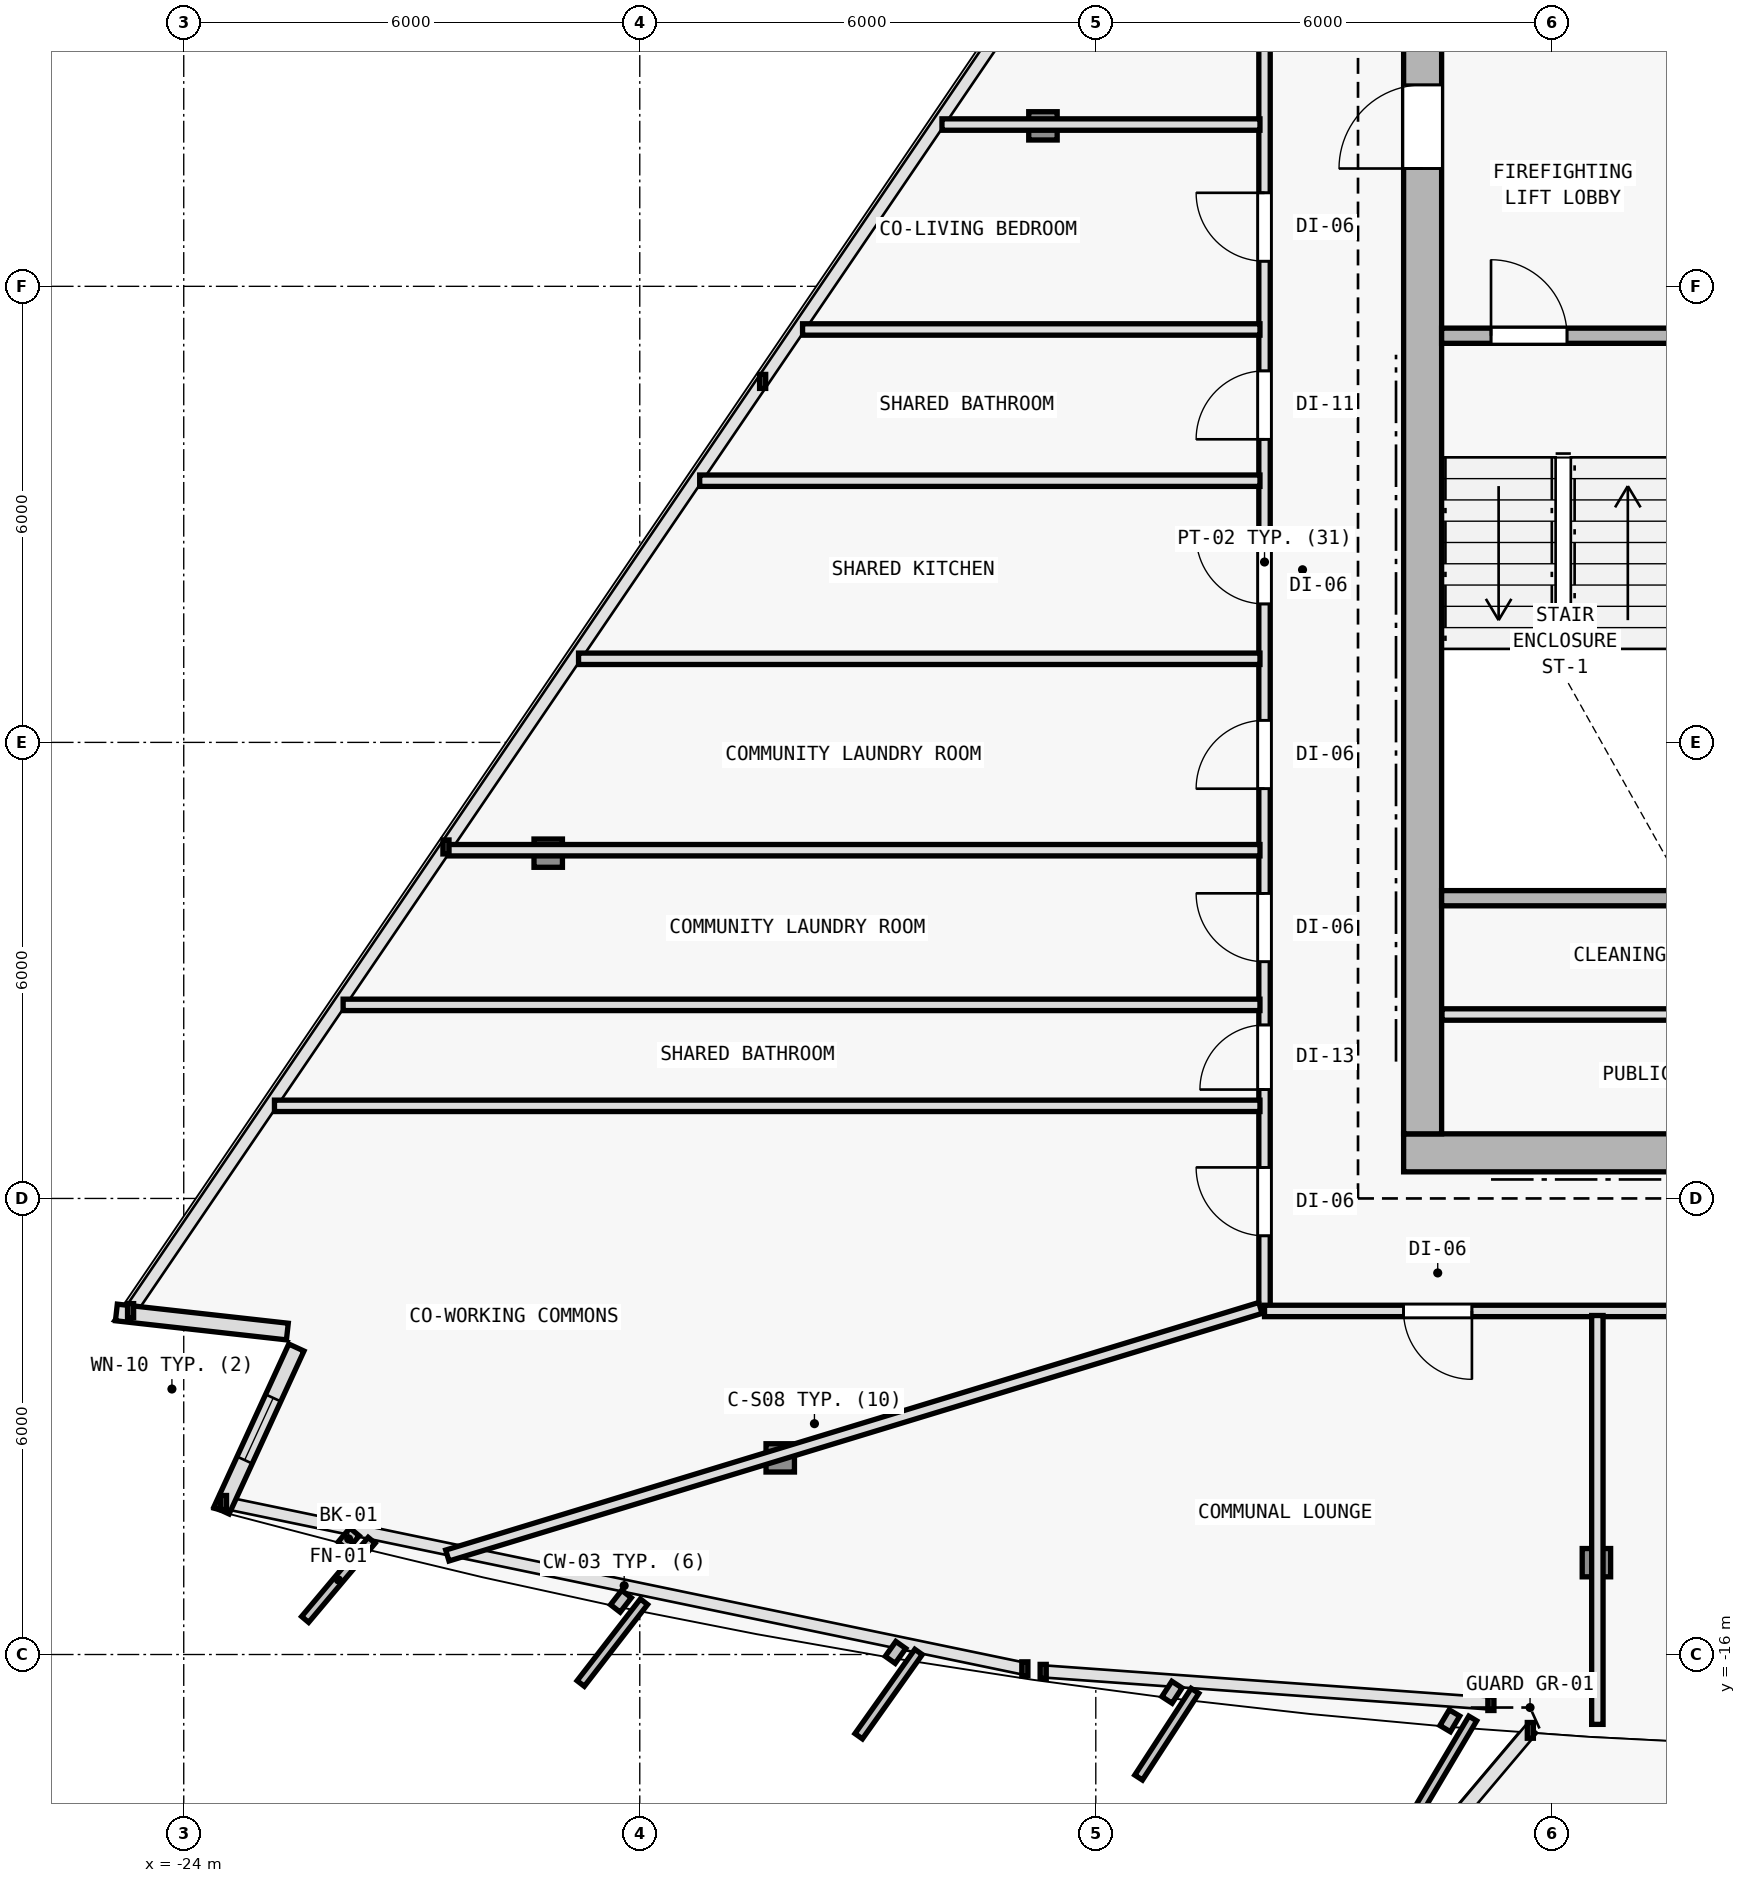
"""IFC4 building model, lengths in metres.
Left out: names, types, materials, properties, quantities, classifications, styles, units other than length and angle.
Written with IfcOpenShell. Run it as: python <this file> out.ifc"""

import sys

from ifc_helpers import new_model, si_unit, direction, frame, frame_2d, origin, origin_2d, place, context, subcontext, project, spatial, rectangle, i_section, extrude, element, fill, save


model = new_model("IFC4")
c1 = context("Model", 3, precision=1e-05, world=origin(), true_north=direction((0.0, 1.0)))
c2 = subcontext(c1, "Body", "Model", "MODEL_VIEW")
j1 = project(units=[si_unit("LENGTHUNIT", "METRE"), si_unit("PLANEANGLEUNIT", "RADIAN")], contexts=[c1])
p1 = place(None, origin())
s1 = spatial("IfcSite", under=j1, at=p1, CompositionType="ELEMENT")
p2 = place(p1, origin())
s2 = spatial("IfcBuilding", under=s1, at=p2, CompositionType="ELEMENT")
p3 = place(p2, frame((0.0, 0.0, 237.9)))
s3 = spatial("IfcBuildingStorey", under=s2, at=p3, CompositionType="ELEMENT", Elevation=237.9)
for number, where, z_axis, x_axis in (
    (1, (-7.7, -9.4, 0.0), (0.0, 0.0, 1.0), (1.0, 0.0, 0.0)),
    (2, (-7.7, 2.0, 0.0), (0.0, 0.0, 1.0), (1.0, 0.0, 0.0)),
):
    element("IfcColumn", number, at=place(p3, frame(where, z_axis=z_axis, x_axis=x_axis)), inside=s3, PredefinedType="COLUMN", context=c2, shape_type="SweptSolid", body=[
        extrude(i_section(OverallWidth=0.398, OverallDepth=0.387, WebThickness=0.013, FlangeThickness=0.022, FilletRadius=0.015, at=origin_2d()), origin(), (0.0, 0.0, 1.0), 3.6),
    ])
p4 = place(p3, frame((-16.152, -13.413, 0.006), z_axis=(0.020596292833, 0.033511459955, 0.999226087917), x_axis=(-0.851954850327, 0.523615252838, 0.0)))
e3 = element("IfcColumn", 3, at=p4, inside=s3, PredefinedType="COLUMN", context=c2, shape_type="SweptSolid", body=[
    extrude(i_section(OverallWidth=0.374, OverallDepth=0.372, WebThickness=0.012, FlangeThickness=0.02, FilletRadius=0.015, at=origin_2d()), origin(), (0.0, 0.0, 1.0), 3.592),
])
p5 = place(p3, frame((-5.413, -14.792, 0.006), z_axis=(0.006934304776, 0.03521539092, 0.999355688261), x_axis=(-0.981159154887, 0.193201223549, 0.0)))
e4 = element("IfcColumn", 4, at=p5, inside=s3, PredefinedType="COLUMN", context=c2, shape_type="SweptSolid", body=[
    extrude(i_section(OverallWidth=0.374, OverallDepth=0.372, WebThickness=0.012, FlangeThickness=0.02, FilletRadius=0.015, at=origin_2d()), origin(), (0.0, 0.0, 1.0), 3.591),
])
p6 = place(p3, frame((-12.695, 4.111, 0.006), z_axis=(0.017003561856, 0.009590008887, 0.99980943715), x_axis=(-0.491253415567, 0.871016694268, 0.0)))
e5 = element("IfcColumn", 5, at=p6, inside=s3, PredefinedType="COLUMN", context=c2, shape_type="SweptSolid", body=[
    extrude(i_section(OverallWidth=0.374, OverallDepth=0.372, WebThickness=0.012, FlangeThickness=0.02, FilletRadius=0.015, at=origin_2d()), origin(), (0.0, 0.0, 1.0), 3.59),
])
p7 = place(p3, frame((-19.205, -5.457, 0.006), z_axis=(0.025224163578, 0.021620711639, 0.999447990843), x_axis=(-0.650791373456, 0.759256602365, 0.0)))
e6 = element("IfcColumn", 6, at=p7, inside=s3, PredefinedType="COLUMN", context=c2, shape_type="SweptSolid", body=[
    extrude(i_section(OverallWidth=0.374, OverallDepth=0.372, WebThickness=0.012, FlangeThickness=0.02, FilletRadius=0.015, at=origin_2d()), origin(), (0.0, 0.0, 1.0), 3.591),
])
p8 = place(p3, frame((-22.637, -11.751, 0.0), z_axis=(0.0, 0.0, 1.0), x_axis=(-0.993821756753, 0.110987908368, 0.0)))
e7 = element("IfcWall", 7, at=p8, inside=s3, PredefinedType="SOLIDWALL", context=c2, shape_type="SweptSolid", body=[
    extrude(rectangle(XDim=2.263, YDim=0.22, at=frame_2d((1.132, 0.0))), origin(), (0.0, 0.0, 1.0), 3.28),
])
p9 = place(p3, frame((-23.503, -14.105, 0.0), z_axis=(0.0, 0.0, 1.0), x_axis=(0.417541737863, 0.908657744777, 0.0)))
e8 = element("IfcWall", 8, at=p9, inside=s3, PredefinedType="SOLIDWALL", context=c2, shape_type="SweptSolid", body=[
    extrude(rectangle(XDim=2.359, YDim=0.22, at=frame_2d((1.18, 0.0))), origin(), (0.0, 0.0, 1.0), 3.28),
])
p10 = place(p9, frame((0.729, 0.0, 0.62)))
e9 = element("IfcOpeningElement", 9, at=p10, cuts=e8, PredefinedType="OPENING", context=c2, shape_type="SweptSolid", body=[
    extrude(rectangle(XDim=0.9, YDim=1.6, at=frame_2d((0.45, 0.8))), frame((0.0, 0.12, 0.0), z_axis=(0.0, -1.0, 0.0), x_axis=(1.0, 0.0, 0.0)), (0.0, 0.0, 1.0), 0.24),
])
p11 = place(p3, frame((-7.95, -9.4, 0.0), z_axis=(0.0, 0.0, 1.0), x_axis=(1.0, 0.0, 0.0)))
e10 = element("IfcWall", 10, at=p11, inside=s3, PredefinedType="SHEAR", context=c2, shape_type="SweptSolid", body=[
    extrude(rectangle(XDim=15.9, YDim=0.5, at=frame_2d((7.95, 0.0))), origin(), (0.0, 0.0, 1.0), 3.28),
])
p12 = place(p11, frame((9.6, 0.0, 0.0)))
e11 = element("IfcOpeningElement", 11, at=p12, cuts=e10, PredefinedType="OPENING", context=c2, shape_type="SweptSolid", body=[
    extrude(rectangle(XDim=1.5, YDim=2.2, at=frame_2d((0.75, 1.1))), frame((0.0, 0.26, 0.0), z_axis=(0.0, -1.0, 0.0), x_axis=(1.0, 0.0, 0.0)), (0.0, 0.0, 1.0), 0.52),
])
p13 = place(p3, frame((-7.7, -9.15, 0.0), z_axis=(0.0, 0.0, 1.0), x_axis=(0.0, 1.0, 0.0)))
e12 = element("IfcWall", 12, at=p13, inside=s3, PredefinedType="SHEAR", context=c2, shape_type="SweptSolid", body=[
    extrude(rectangle(XDim=19.1, YDim=0.5, at=frame_2d((9.55, 0.0))), origin(), (0.0, 0.0, 1.0), 3.28),
])
p14 = place(p13, frame((12.7, 0.0, 0.0)))
e13 = element("IfcOpeningElement", 13, at=p14, cuts=e12, PredefinedType="OPENING", context=c2, shape_type="SweptSolid", body=[
    extrude(rectangle(XDim=1.1, YDim=2.15, at=frame_2d((0.55, 1.075))), frame((0.0, 0.26, 0.0), z_axis=(0.0, -1.0, 0.0), x_axis=(1.0, 0.0, 0.0)), (0.0, 0.0, 1.0), 0.52),
])
p15 = place(p3, frame((-7.45, 1.35, 0.0), z_axis=(0.0, 0.0, 1.0), x_axis=(1.0, 0.0, 0.0)))
e14 = element("IfcWall", 14, at=p15, inside=s3, PredefinedType="SOLIDWALL", context=c2, shape_type="SweptSolid", body=[
    extrude(rectangle(XDim=3.4, YDim=0.2, at=frame_2d((1.7, 0.0))), origin(), (0.0, 0.0, 1.0), 3.28),
])
p16 = place(p15, frame((0.65, 0.0, 0.0)))
e15 = element("IfcOpeningElement", 15, at=p16, cuts=e14, PredefinedType="OPENING", context=c2, shape_type="SweptSolid", body=[
    extrude(rectangle(XDim=1.0, YDim=2.15, at=frame_2d((0.5, 1.075))), frame((0.0, 0.11, 0.0), z_axis=(0.0, -1.0, 0.0), x_axis=(1.0, 0.0, 0.0)), (0.0, 0.0, 1.0), 0.22),
])
p17 = place(p3, frame((-7.45, -6.05, 0.0), z_axis=(0.0, 0.0, 1.0), x_axis=(1.0, 0.0, 0.0)))
e16 = element("IfcWall", 16, at=p17, inside=s3, PredefinedType="SOLIDWALL", context=c2, shape_type="SweptSolid", body=[
    extrude(rectangle(XDim=3.4, YDim=0.2, at=frame_2d((1.7, 0.0))), origin(), (0.0, 0.0, 1.0), 3.28),
])
p18 = place(p3, frame((-7.445, -7.58, 0.0), z_axis=(0.0, 0.0, 1.0), x_axis=(1.0, 0.0, 0.0)))
e17 = element("IfcWall", 17, at=p18, inside=s3, PredefinedType="PARTITIONING", context=c2, shape_type="SweptSolid", body=[
    extrude(rectangle(XDim=6.195, YDim=0.15, at=frame_2d((3.098, 0.0))), origin(), (0.0, 0.0, 1.0), 3.28),
])
p19 = place(p3, frame((-9.78, -11.48, 0.0), z_axis=(0.0, 0.0, 1.0), x_axis=(0.0, 1.0, 0.0)))
e18 = element("IfcWall", 18, at=p19, inside=s3, PredefinedType="PARTITIONING", context=c2, shape_type="SweptSolid", body=[
    extrude(rectangle(XDim=19.706, YDim=0.15, at=frame_2d((9.853, 0.0))), origin(), (0.0, 0.0, 1.0), 2.755),
])
p20 = place(p19, frame((9.301, 0.0, 0.0)))
e19 = element("IfcOpeningElement", 19, at=p20, cuts=e18, PredefinedType="OPENING", context=c2, shape_type="SweptSolid", body=[
    extrude(rectangle(XDim=0.9, YDim=2.1, at=frame_2d((0.45, 1.05))), frame((0.0, 0.085, 0.0), z_axis=(0.0, -1.0, 0.0), x_axis=(1.0, 0.0, 0.0)), (0.0, 0.0, 1.0), 0.17),
])
p21 = place(p19, frame((6.871, 0.0, 0.0)))
e20 = element("IfcOpeningElement", 20, at=p21, cuts=e18, PredefinedType="OPENING", context=c2, shape_type="SweptSolid", body=[
    extrude(rectangle(XDim=0.9, YDim=2.1, at=frame_2d((0.45, 1.05))), frame((0.0, 0.085, 0.0), z_axis=(0.0, -1.0, 0.0), x_axis=(1.0, 0.0, 0.0)), (0.0, 0.0, 1.0), 0.17),
])
p22 = place(p19, frame((4.594, 0.0, 0.0)))
e21 = element("IfcOpeningElement", 21, at=p22, cuts=e18, PredefinedType="OPENING", context=c2, shape_type="SweptSolid", body=[
    extrude(rectangle(XDim=0.9, YDim=2.1, at=frame_2d((0.45, 1.05))), frame((0.0, 0.085, 0.0), z_axis=(0.0, -1.0, 0.0), x_axis=(1.0, 0.0, 0.0)), (0.0, 0.0, 1.0), 0.17),
])
p23 = place(p19, frame((2.913, 0.0, 0.0)))
e22 = element("IfcOpeningElement", 22, at=p23, cuts=e18, PredefinedType="OPENING", context=c2, shape_type="SweptSolid", body=[
    extrude(rectangle(XDim=0.85, YDim=2.1, at=frame_2d((0.425, 1.05))), frame((0.0, 0.085, 0.0), z_axis=(0.0, -1.0, 0.0), x_axis=(1.0, 0.0, 0.0)), (0.0, 0.0, 1.0), 0.17),
])
p24 = place(p19, frame((0.988, 0.0, 0.0)))
e23 = element("IfcOpeningElement", 23, at=p24, cuts=e18, PredefinedType="OPENING", context=c2, shape_type="SweptSolid", body=[
    extrude(rectangle(XDim=0.9, YDim=2.1, at=frame_2d((0.45, 1.05))), frame((0.0, 0.085, 0.0), z_axis=(0.0, -1.0, 0.0), x_axis=(1.0, 0.0, 0.0)), (0.0, 0.0, 1.0), 0.17),
])
p25 = place(p19, frame((13.81, 0.0, 0.0)))
e24 = element("IfcOpeningElement", 24, at=p25, cuts=e18, PredefinedType="OPENING", context=c2, shape_type="SweptSolid", body=[
    extrude(rectangle(XDim=0.9, YDim=2.1, at=frame_2d((0.45, 1.05))), frame((0.0, 0.085, 0.0), z_axis=(0.0, -1.0, 0.0), x_axis=(1.0, 0.0, 0.0)), (0.0, 0.0, 1.0), 0.17),
])
p26 = place(p19, frame((11.468, 0.0, 0.0)))
e25 = element("IfcOpeningElement", 25, at=p26, cuts=e18, PredefinedType="OPENING", context=c2, shape_type="SweptSolid", body=[
    extrude(rectangle(XDim=0.9, YDim=2.1, at=frame_2d((0.45, 1.05))), frame((0.0, 0.085, 0.0), z_axis=(0.0, -1.0, 0.0), x_axis=(1.0, 0.0, 0.0)), (0.0, 0.0, 1.0), 0.17),
])
p27 = place(p3, frame((9.78, -11.48, 0.0), z_axis=(0.0, 0.0, 1.0), x_axis=(-1.0, 0.0, 0.0)))
e26 = element("IfcWall", 26, at=p27, inside=s3, PredefinedType="PARTITIONING", context=c2, shape_type="SweptSolid", body=[
    extrude(rectangle(XDim=19.56, YDim=0.15, at=frame_2d((9.78, 0.0))), origin(), (0.0, 0.0, 1.0), 2.935),
])
p28 = place(p27, frame((16.831, 0.0, 0.0)))
e27 = element("IfcOpeningElement", 27, at=p28, cuts=e26, PredefinedType="OPENING", context=c2, shape_type="SweptSolid", body=[
    extrude(rectangle(XDim=0.9, YDim=2.1, at=frame_2d((0.45, 1.05))), frame((0.0, 0.085, 0.0), z_axis=(0.0, -1.0, 0.0), x_axis=(1.0, 0.0, 0.0)), (0.0, 0.0, 1.0), 0.17),
])
p29 = place(p3, frame((-9.834, -11.441, 0.0), z_axis=(0.0, 0.0, 1.0), x_axis=(-0.956642939797, -0.291263258474, 0.0)))
e28 = element("IfcWall", 28, at=p29, inside=s3, PredefinedType="PARTITIONING", context=c2, shape_type="SweptSolid", body=[
    extrude(rectangle(XDim=11.183, YDim=0.15, at=frame_2d((5.591, 0.0))), origin(), (0.0, 0.0, 1.0), 2.705),
])
p30 = place(p3, frame((-5.401, -11.54, 0.0), z_axis=(0.0, 0.0, 1.0), x_axis=(0.0, -1.0, 0.0)))
e29 = element("IfcWall", 29, at=p30, inside=s3, PredefinedType="PARTITIONING", context=c2, shape_type="SweptSolid", body=[
    extrude(rectangle(XDim=5.379, YDim=0.15, at=frame_2d((2.689, 0.0))), origin(), (0.0, 0.0, 1.0), 2.705),
])
p31 = place(p3, frame((-9.84, 4.128, 0.0), z_axis=(0.0, 0.0, 1.0), x_axis=(-1.0, 0.0, 0.0)))
e30 = element("IfcWall", 30, at=p31, inside=s3, PredefinedType="PARTITIONING", context=c2, shape_type="SweptSolid", body=[
    extrude(rectangle(XDim=4.184, YDim=0.15, at=frame_2d((2.092, 0.0))), origin(), (0.0, 0.0, 1.0), 2.905),
])
p32 = place(p3, frame((-9.84, -5.418, 0.0), z_axis=(0.0, 0.0, 1.0), x_axis=(-1.0, 0.0, 0.0)))
e31 = element("IfcWall", 31, at=p32, inside=s3, PredefinedType="PARTITIONING", context=c2, shape_type="SweptSolid", body=[
    extrude(rectangle(XDim=10.678, YDim=0.15, at=frame_2d((5.339, 0.0))), origin(), (0.0, 0.0, 1.0), 2.705),
])
p33 = place(p3, frame((-9.84, -0.557, 0.0), z_axis=(0.0, 0.0, 1.0), x_axis=(-1.0, 0.0, 0.0)))
e32 = element("IfcWall", 32, at=p33, inside=s3, PredefinedType="PARTITIONING", context=c2, shape_type="SweptSolid", body=[
    extrude(rectangle(XDim=7.372, YDim=0.15, at=frame_2d((3.686, 0.0))), origin(), (0.0, 0.0, 1.0), 2.705),
])
p34 = place(p3, frame((-9.84, -8.781, 0.0), z_axis=(0.0, 0.0, 1.0), x_axis=(-1.0, 0.0, 0.0)))
e33 = element("IfcWall", 33, at=p34, inside=s3, PredefinedType="PARTITIONING", context=c2, shape_type="SweptSolid", body=[
    extrude(rectangle(XDim=12.966, YDim=0.15, at=frame_2d((6.483, 0.0))), origin(), (0.0, 0.0, 1.0), 2.805),
])
p35 = place(p3, frame((-9.84, -2.9, 0.0), z_axis=(0.0, 0.0, 1.0), x_axis=(-1.0, 0.0, 0.0)))
e34 = element("IfcWall", 34, at=p35, inside=s3, PredefinedType="PARTITIONING", context=c2, shape_type="SweptSolid", body=[
    extrude(rectangle(XDim=8.965, YDim=0.15, at=frame_2d((4.483, 0.0))), origin(), (0.0, 0.0, 1.0), 2.705),
])
p36 = place(p3, frame((-9.84, -7.453, 0.0), z_axis=(0.0, 0.0, 1.0), x_axis=(-1.0, 0.0, 0.0)))
e35 = element("IfcWall", 35, at=p36, inside=s3, PredefinedType="PARTITIONING", context=c2, shape_type="SweptSolid", body=[
    extrude(rectangle(XDim=12.063, YDim=0.15, at=frame_2d((6.031, 0.0))), origin(), (0.0, 0.0, 1.0), 2.755),
])
p37 = place(p3, frame((-9.84, 1.432, 0.0), z_axis=(0.0, 0.0, 1.0), x_axis=(-1.0, 0.0, 0.0)))
e36 = element("IfcWall", 36, at=p37, inside=s3, PredefinedType="PARTITIONING", context=c2, shape_type="SweptSolid", body=[
    extrude(rectangle(XDim=6.018, YDim=0.15, at=frame_2d((3.009, 0.0))), origin(), (0.0, 0.0, 1.0), 2.705),
])
p38 = place(p10, origin())
e37 = element("IfcWindow", 37, at=p38, inside=s3, PartitioningType="SINGLE_PANEL", PredefinedType="WINDOW", context=c2, shape_type="SweptSolid", body=[
    extrude(rectangle(XDim=0.9, YDim=1.6, at=frame_2d((0.45, 0.8))), frame((0.0, 0.03, 0.0), z_axis=(0.0, -1.0, 0.0), x_axis=(1.0, 0.0, 0.0)), (0.0, 0.0, 1.0), 0.06),
])
fill(e9, e37)
p39 = place(p14, origin())
e38 = element("IfcDoor", 38, at=p39, inside=s3, OperationType="SINGLE_SWING_LEFT", PredefinedType="DOOR", context=c2, shape_type="SweptSolid", body=[
    extrude(rectangle(XDim=1.1, YDim=2.15, at=frame_2d((0.55, 1.075))), frame((0.0, 0.025, 0.0), z_axis=(0.0, -1.0, 0.0), x_axis=(1.0, 0.0, 0.0)), (0.0, 0.0, 1.0), 0.05),
])
fill(e13, e38)
p40 = place(p16, origin())
e39 = element("IfcDoor", 39, at=p40, inside=s3, OperationType="SINGLE_SWING_LEFT", PredefinedType="DOOR", context=c2, shape_type="SweptSolid", body=[
    extrude(rectangle(XDim=1.0, YDim=2.15, at=frame_2d((0.5, 1.075))), frame((0.0, 0.025, 0.0), z_axis=(0.0, -1.0, 0.0), x_axis=(1.0, 0.0, 0.0)), (0.0, 0.0, 1.0), 0.05),
])
fill(e15, e39)
p41 = place(p20, origin())
e40 = element("IfcDoor", 40, at=p41, inside=s3, OperationType="SINGLE_SWING_RIGHT", PredefinedType="DOOR", context=c2, shape_type="SweptSolid", body=[
    extrude(rectangle(XDim=0.9, YDim=2.1, at=frame_2d((0.45, 1.05))), frame((0.0, 0.025, 0.0), z_axis=(0.0, -1.0, 0.0), x_axis=(1.0, 0.0, 0.0)), (0.0, 0.0, 1.0), 0.05),
])
fill(e19, e40)
p42 = place(p21, origin())
e41 = element("IfcDoor", 41, at=p42, inside=s3, OperationType="SINGLE_SWING_LEFT", PredefinedType="DOOR", context=c2, shape_type="SweptSolid", body=[
    extrude(rectangle(XDim=0.9, YDim=2.1, at=frame_2d((0.45, 1.05))), frame((0.0, 0.025, 0.0), z_axis=(0.0, -1.0, 0.0), x_axis=(1.0, 0.0, 0.0)), (0.0, 0.0, 1.0), 0.05),
])
fill(e20, e41)
p43 = place(p22, origin())
e42 = element("IfcDoor", 42, at=p43, inside=s3, OperationType="SINGLE_SWING_RIGHT", PredefinedType="DOOR", context=c2, shape_type="SweptSolid", body=[
    extrude(rectangle(XDim=0.9, YDim=2.1, at=frame_2d((0.45, 1.05))), frame((0.0, 0.025, 0.0), z_axis=(0.0, -1.0, 0.0), x_axis=(1.0, 0.0, 0.0)), (0.0, 0.0, 1.0), 0.05),
])
fill(e21, e42)
p44 = place(p23, origin())
e43 = element("IfcDoor", 43, at=p44, inside=s3, OperationType="SINGLE_SWING_LEFT", PredefinedType="DOOR", context=c2, shape_type="SweptSolid", body=[
    extrude(rectangle(XDim=0.85, YDim=2.1, at=frame_2d((0.425, 1.05))), frame((0.0, 0.025, 0.0), z_axis=(0.0, -1.0, 0.0), x_axis=(1.0, 0.0, 0.0)), (0.0, 0.0, 1.0), 0.05),
])
fill(e22, e43)
p45 = place(p24, origin())
e44 = element("IfcDoor", 44, at=p45, inside=s3, OperationType="SINGLE_SWING_RIGHT", PredefinedType="DOOR", context=c2, shape_type="SweptSolid", body=[
    extrude(rectangle(XDim=0.9, YDim=2.1, at=frame_2d((0.45, 1.05))), frame((0.0, 0.025, 0.0), z_axis=(0.0, -1.0, 0.0), x_axis=(1.0, 0.0, 0.0)), (0.0, 0.0, 1.0), 0.05),
])
fill(e23, e44)
p46 = place(p28, origin())
e45 = element("IfcDoor", 45, at=p46, inside=s3, OperationType="SINGLE_SWING_LEFT", PredefinedType="DOOR", context=c2, shape_type="SweptSolid", body=[
    extrude(rectangle(XDim=0.9, YDim=2.1, at=frame_2d((0.45, 1.05))), frame((0.0, 0.025, 0.0), z_axis=(0.0, -1.0, 0.0), x_axis=(1.0, 0.0, 0.0)), (0.0, 0.0, 1.0), 0.05),
])
fill(e27, e45)
p47 = place(p25, origin())
e46 = element("IfcDoor", 46, at=p47, inside=s3, OperationType="SINGLE_SWING_RIGHT", PredefinedType="DOOR", context=c2, shape_type="SweptSolid", body=[
    extrude(rectangle(XDim=0.9, YDim=2.1, at=frame_2d((0.45, 1.05))), frame((0.0, 0.025, 0.0), z_axis=(0.0, -1.0, 0.0), x_axis=(1.0, 0.0, 0.0)), (0.0, 0.0, 1.0), 0.05),
])
fill(e24, e46)
p48 = place(p26, origin())
e47 = element("IfcDoor", 47, at=p48, inside=s3, OperationType="SINGLE_SWING_LEFT", PredefinedType="DOOR", context=c2, shape_type="SweptSolid", body=[
    extrude(rectangle(XDim=0.9, YDim=2.1, at=frame_2d((0.45, 1.05))), frame((0.0, 0.025, 0.0), z_axis=(0.0, -1.0, 0.0), x_axis=(1.0, 0.0, 0.0)), (0.0, 0.0, 1.0), 0.05),
])
fill(e25, e47)
save(model, sys.argv[1])
